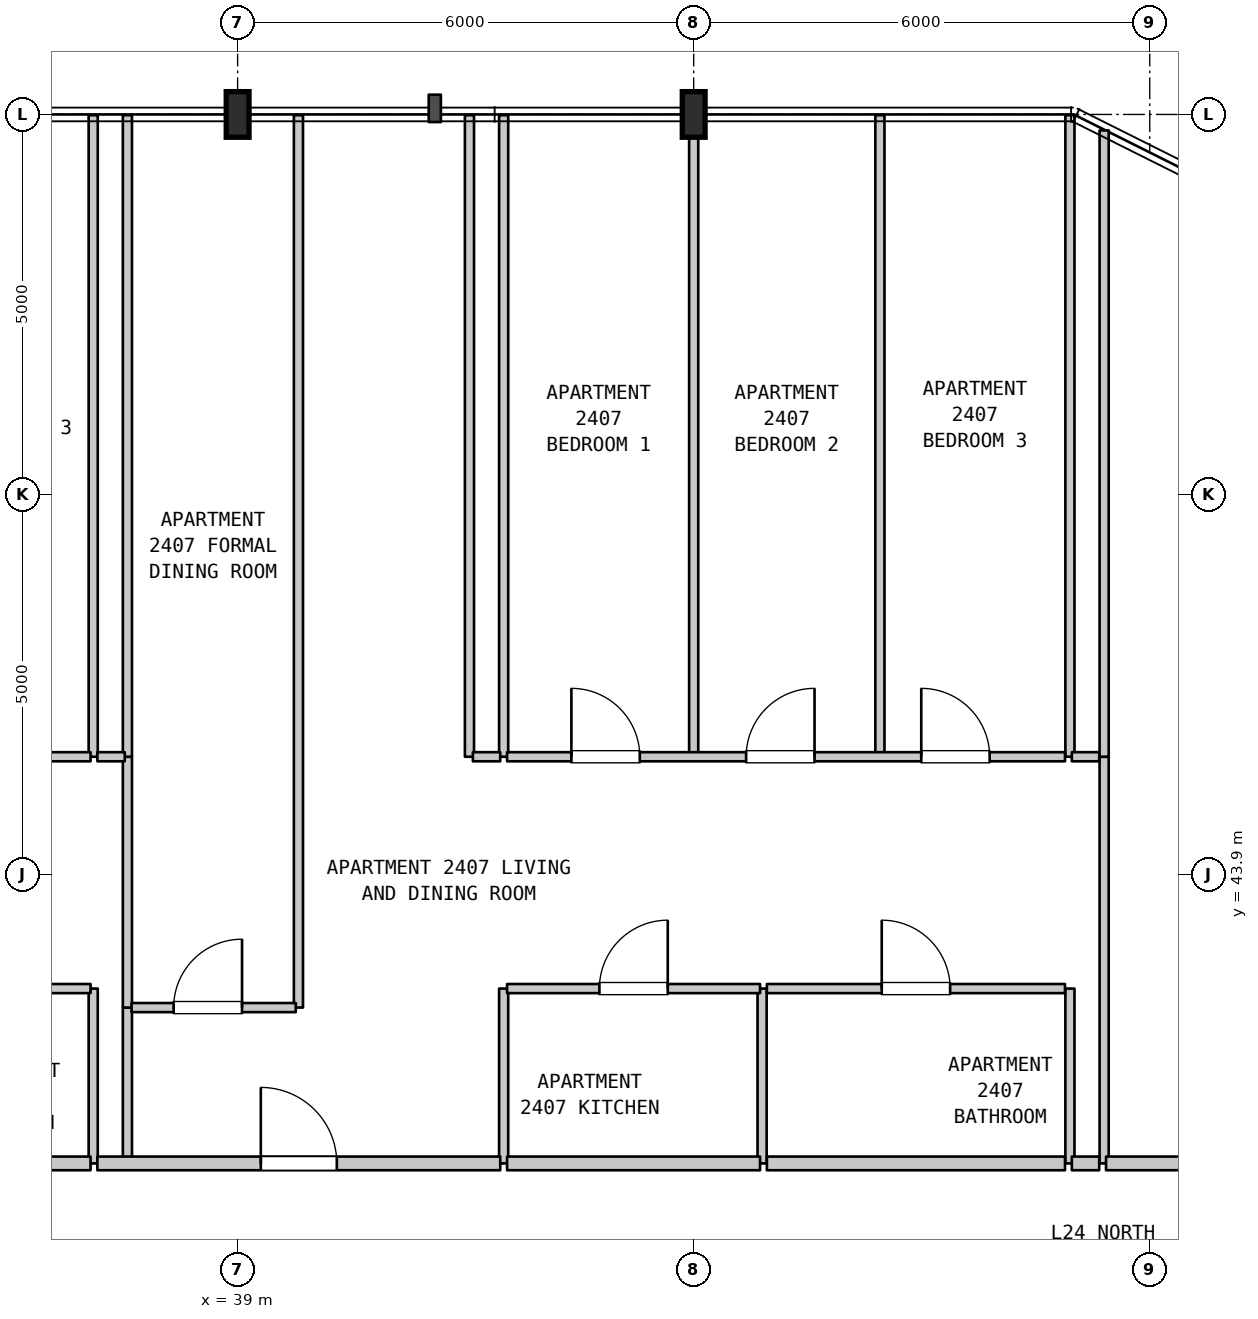
"""IFC4 building model, lengths in metres.
Left out: names, types, materials, properties, quantities, classifications, styles, units other than length and angle.
Written with IfcOpenShell. Run it as: python <this file> out.ifc"""

import sys

from ifc_helpers import new_model, si_unit, direction, frame, frame_2d, origin, origin_2d, place, context, subcontext, project, spatial, rectangle, i_section, extrude, element, fill, save


model = new_model("IFC4")
c1 = context("Model", 3, precision=1e-05, world=origin(), true_north=direction((0.0, 1.0)))
c2 = subcontext(c1, "Body", "Model", "MODEL_VIEW")
j1 = project(units=[si_unit("LENGTHUNIT", "METRE"), si_unit("PLANEANGLEUNIT", "RADIAN")], contexts=[c1])
p1 = place(None, origin())
s1 = spatial("IfcSite", under=j1, at=p1, CompositionType="ELEMENT")
p2 = place(p1, origin())
s2 = spatial("IfcBuilding", under=s1, at=p2, CompositionType="ELEMENT")
p3 = place(p2, frame((0.0, 0.0, 102.0)))
s3 = spatial("IfcBuildingStorey", under=s2, at=p3, CompositionType="ELEMENT", Elevation=102.0)
for number, where, z_axis, x_axis in (
    (1, (39.0, 53.9, 0.0), (0.0, 0.0, 1.0), (1.0, 0.0, 0.0)),
    (2, (45.0, 53.9, 0.0), (0.0, 0.0, 1.0), (1.0, 0.0, 0.0)),
):
    element("IfcColumn", number, at=place(p3, frame(where, z_axis=z_axis, x_axis=x_axis)), inside=s3, PredefinedType="COLUMN", context=c2, shape_type="SweptSolid", body=[
        extrude(i_section(OverallWidth=0.3, OverallDepth=0.6, WebThickness=0.015, FlangeThickness=0.03, FilletRadius=0.027, at=origin_2d()), origin(), (0.0, 0.0, 1.0), 3.7),
    ])
p4 = place(p3, frame((37.1, 40.1, 0.0), z_axis=(0.0, 0.0, 1.0), x_axis=(0.0, 1.0, 0.0)))
e3 = element("IfcWall", 3, at=p4, inside=s3, PredefinedType="PARTITIONING", context=c2, shape_type="SweptSolid", body=[
    extrude(rectangle(XDim=2.3, YDim=0.12, at=frame_2d((1.15, 0.0))), origin(), (0.0, 0.0, 1.0), 3.385),
])
p5 = place(p3, frame((37.1, 45.45, 0.0), z_axis=(0.0, 0.0, 1.0), x_axis=(0.0, 1.0, 0.0)))
e4 = element("IfcWall", 4, at=p5, inside=s3, PredefinedType="PARTITIONING", context=c2, shape_type="SweptSolid", body=[
    extrude(rectangle(XDim=8.44, YDim=0.12, at=frame_2d((4.22, 0.0))), origin(), (0.0, 0.0, 1.0), 3.385),
])
p6 = place(p3, frame((37.55, 40.1, 0.0), z_axis=(0.0, 0.0, 1.0), x_axis=(0.0, 1.0, 0.0)))
e5 = element("IfcWall", 5, at=p6, inside=s3, PredefinedType="PARTITIONING", context=c2, shape_type="SweptSolid", body=[
    extrude(rectangle(XDim=2.05, YDim=0.12, at=frame_2d((1.025, 0.0))), origin(), (0.0, 0.0, 1.0), 3.385),
])
p7 = place(p3, frame((37.55, 42.15, 0.0), z_axis=(0.0, 0.0, 1.0), x_axis=(0.0, 1.0, 0.0)))
e6 = element("IfcWall", 6, at=p7, inside=s3, PredefinedType="PARTITIONING", context=c2, shape_type="SweptSolid", body=[
    extrude(rectangle(XDim=3.3, YDim=0.12, at=frame_2d((1.65, 0.0))), origin(), (0.0, 0.0, 1.0), 3.385),
])
p8 = place(p3, frame((37.55, 45.45, 0.0), z_axis=(0.0, 0.0, 1.0), x_axis=(0.0, 1.0, 0.0)))
e7 = element("IfcWall", 7, at=p8, inside=s3, PredefinedType="PARTITIONING", context=c2, shape_type="SweptSolid", body=[
    extrude(rectangle(XDim=8.44, YDim=0.12, at=frame_2d((4.22, 0.0))), origin(), (0.0, 0.0, 1.0), 3.385),
])
p9 = place(p3, frame((39.8, 42.15, 0.0), z_axis=(0.0, 0.0, 1.0), x_axis=(0.0, 1.0, 0.0)))
e8 = element("IfcWall", 8, at=p9, inside=s3, PredefinedType="PARTITIONING", context=c2, shape_type="SweptSolid", body=[
    extrude(rectangle(XDim=11.74, YDim=0.12, at=frame_2d((5.87, 0.0))), origin(), (0.0, 0.0, 1.0), 3.385),
])
p10 = place(p3, frame((42.05, 45.45, 0.0), z_axis=(0.0, 0.0, 1.0), x_axis=(0.0, 1.0, 0.0)))
e9 = element("IfcWall", 9, at=p10, inside=s3, PredefinedType="PARTITIONING", context=c2, shape_type="SweptSolid", body=[
    extrude(rectangle(XDim=8.44, YDim=0.12, at=frame_2d((4.22, 0.0))), origin(), (0.0, 0.0, 1.0), 3.385),
])
p11 = place(p3, frame((42.5, 40.1, 0.0), z_axis=(0.0, 0.0, 1.0), x_axis=(0.0, 1.0, 0.0)))
e10 = element("IfcWall", 10, at=p11, inside=s3, PredefinedType="PARTITIONING", context=c2, shape_type="SweptSolid", body=[
    extrude(rectangle(XDim=2.3, YDim=0.12, at=frame_2d((1.15, 0.0))), origin(), (0.0, 0.0, 1.0), 3.385),
])
for number, where, z_axis, x_axis in (
    (11, (42.5, 45.45, 0.0), (0.0, 0.0, 1.0), (0.0, 1.0, 0.0)),
    (12, (45.0, 45.45, 0.0), (0.0, 0.0, 1.0), (0.0, 1.0, 0.0)),
):
    element("IfcWall", number, at=place(p3, frame(where, z_axis=z_axis, x_axis=x_axis)), inside=s3, PredefinedType="PARTITIONING", context=c2, shape_type="SweptSolid", body=[
        extrude(rectangle(XDim=8.44, YDim=0.12, at=frame_2d((4.22, 0.0))), origin(), (0.0, 0.0, 1.0), 3.385),
    ])
p12 = place(p3, frame((45.9, 40.1, 0.0), z_axis=(0.0, 0.0, 1.0), x_axis=(0.0, 1.0, 0.0)))
e13 = element("IfcWall", 13, at=p12, inside=s3, PredefinedType="PARTITIONING", context=c2, shape_type="SweptSolid", body=[
    extrude(rectangle(XDim=2.3, YDim=0.12, at=frame_2d((1.15, 0.0))), origin(), (0.0, 0.0, 1.0), 3.385),
])
p13 = place(p3, frame((47.45, 45.45, 0.0), z_axis=(0.0, 0.0, 1.0), x_axis=(0.0, 1.0, 0.0)))
e14 = element("IfcWall", 14, at=p13, inside=s3, PredefinedType="PARTITIONING", context=c2, shape_type="SweptSolid", body=[
    extrude(rectangle(XDim=8.44, YDim=0.12, at=frame_2d((4.22, 0.0))), origin(), (0.0, 0.0, 1.0), 3.385),
])
p14 = place(p3, frame((49.95, 40.1, 0.0), z_axis=(0.0, 0.0, 1.0), x_axis=(0.0, 1.0, 0.0)))
e15 = element("IfcWall", 15, at=p14, inside=s3, PredefinedType="PARTITIONING", context=c2, shape_type="SweptSolid", body=[
    extrude(rectangle(XDim=2.3, YDim=0.12, at=frame_2d((1.15, 0.0))), origin(), (0.0, 0.0, 1.0), 3.385),
])
p15 = place(p3, frame((49.95, 45.45, 0.0), z_axis=(0.0, 0.0, 1.0), x_axis=(0.0, 1.0, 0.0)))
e16 = element("IfcWall", 16, at=p15, inside=s3, PredefinedType="PARTITIONING", context=c2, shape_type="SweptSolid", body=[
    extrude(rectangle(XDim=8.44, YDim=0.12, at=frame_2d((4.22, 0.0))), origin(), (0.0, 0.0, 1.0), 3.385),
])
p16 = place(p3, frame((50.4, 40.1, 0.0), z_axis=(0.0, 0.0, 1.0), x_axis=(0.0, 1.0, 0.0)))
e17 = element("IfcWall", 17, at=p16, inside=s3, PredefinedType="PARTITIONING", context=c2, shape_type="SweptSolid", body=[
    extrude(rectangle(XDim=5.35, YDim=0.12, at=frame_2d((2.675, 0.0))), origin(), (0.0, 0.0, 1.0), 3.385),
])
p17 = place(p3, frame((50.4, 45.45, 0.0), z_axis=(0.0, 0.0, 1.0), x_axis=(0.0, 1.0, 0.0)))
e18 = element("IfcWall", 18, at=p17, inside=s3, PredefinedType="PARTITIONING", context=c2, shape_type="SweptSolid", body=[
    extrude(rectangle(XDim=8.24, YDim=0.12, at=frame_2d((4.12, 0.0))), origin(), (0.0, 0.0, 1.0), 3.385),
])
p18 = place(p3, frame((34.873, 40.1, 0.0), z_axis=(0.0, 0.0, 1.0), x_axis=(1.0, 0.0, 0.0)))
e19 = element("IfcWall", 19, at=p18, inside=s3, PredefinedType="STANDARD", context=c2, shape_type="SweptSolid", body=[
    extrude(rectangle(XDim=2.192, YDim=0.18, at=frame_2d((1.096, 0.0))), origin(), (0.0, 0.0, 1.0), 3.385),
])
p19 = place(p3, frame((37.155, 40.1, 0.0), z_axis=(0.0, 0.0, 1.0), x_axis=(1.0, 0.0, 0.0)))
e20 = element("IfcWall", 20, at=p19, inside=s3, PredefinedType="STANDARD", context=c2, shape_type="SweptSolid", body=[
    extrude(rectangle(XDim=5.3, YDim=0.18, at=frame_2d((2.65, 0.0))), origin(), (0.0, 0.0, 1.0), 3.385),
])
p20 = place(p19, frame((2.15, 0.0, 0.0)))
e21 = element("IfcOpeningElement", 21, at=p20, cuts=e20, PredefinedType="OPENING", context=c2, shape_type="SweptSolid", body=[
    extrude(rectangle(XDim=1.0, YDim=2.15, at=frame_2d((0.5, 1.075))), frame((0.0, 0.1, 0.0), z_axis=(0.0, -1.0, 0.0), x_axis=(1.0, 0.0, 0.0)), (0.0, 0.0, 1.0), 0.2),
])
p21 = place(p3, frame((42.545, 40.1, 0.0), z_axis=(0.0, 0.0, 1.0), x_axis=(1.0, 0.0, 0.0)))
e22 = element("IfcWall", 22, at=p21, inside=s3, PredefinedType="STANDARD", context=c2, shape_type="SweptSolid", body=[
    extrude(rectangle(XDim=3.328, YDim=0.18, at=frame_2d((1.664, 0.0))), origin(), (0.0, 0.0, 1.0), 3.385),
])
p22 = place(p3, frame((45.963, 40.1, 0.0), z_axis=(0.0, 0.0, 1.0), x_axis=(1.0, 0.0, 0.0)))
e23 = element("IfcWall", 23, at=p22, inside=s3, PredefinedType="STANDARD", context=c2, shape_type="SweptSolid", body=[
    extrude(rectangle(XDim=3.922, YDim=0.18, at=frame_2d((1.961, 0.0))), origin(), (0.0, 0.0, 1.0), 3.385),
])
p23 = place(p3, frame((49.975, 40.1, 0.0), z_axis=(0.0, 0.0, 1.0), x_axis=(1.0, 0.0, 0.0)))
e24 = element("IfcWall", 24, at=p23, inside=s3, PredefinedType="STANDARD", context=c2, shape_type="SweptSolid", body=[
    extrude(rectangle(XDim=0.36, YDim=0.18, at=frame_2d((0.18, 0.0))), origin(), (0.0, 0.0, 1.0), 3.385),
])
p24 = place(p3, frame((50.425, 40.1, 0.0), z_axis=(0.0, 0.0, 1.0), x_axis=(1.0, 0.0, 0.0)))
e25 = element("IfcWall", 25, at=p24, inside=s3, PredefinedType="STANDARD", context=c2, shape_type="SweptSolid", body=[
    extrude(rectangle(XDim=4.03, YDim=0.18, at=frame_2d((2.015, 0.0))), origin(), (0.0, 0.0, 1.0), 3.385),
])
p25 = place(p24, frame((1.515, 0.0, 0.0)))
e26 = element("IfcOpeningElement", 26, at=p25, cuts=e25, PredefinedType="OPENING", context=c2, shape_type="SweptSolid", body=[
    extrude(rectangle(XDim=1.0, YDim=2.15, at=frame_2d((0.5, 1.075))), frame((0.0, 0.1, 0.0), z_axis=(0.0, -1.0, 0.0), x_axis=(1.0, 0.0, 0.0)), (0.0, 0.0, 1.0), 0.2),
])
p26 = place(p3, frame((37.605, 42.15, 0.0), z_axis=(0.0, 0.0, 1.0), x_axis=(1.0, 0.0, 0.0)))
e27 = element("IfcWall", 27, at=p26, inside=s3, PredefinedType="PARTITIONING", context=c2, shape_type="SweptSolid", body=[
    extrude(rectangle(XDim=2.16, YDim=0.12, at=frame_2d((1.08, 0.0))), origin(), (0.0, 0.0, 1.0), 3.385),
])
p27 = place(p26, frame((0.553, 0.0, 0.0)))
e28 = element("IfcOpeningElement", 28, at=p27, cuts=e27, PredefinedType="OPENING", context=c2, shape_type="SweptSolid", body=[
    extrude(rectangle(XDim=0.9, YDim=2.15, at=frame_2d((0.45, 1.075))), frame((0.0, 0.07, 0.0), z_axis=(0.0, -1.0, 0.0), x_axis=(1.0, 0.0, 0.0)), (0.0, 0.0, 1.0), 0.14),
])
p28 = place(p3, frame((34.873, 42.4, 0.0), z_axis=(0.0, 0.0, 1.0), x_axis=(1.0, 0.0, 0.0)))
e29 = element("IfcWall", 29, at=p28, inside=s3, PredefinedType="PARTITIONING", context=c2, shape_type="SweptSolid", body=[
    extrude(rectangle(XDim=2.192, YDim=0.12, at=frame_2d((1.096, 0.0))), origin(), (0.0, 0.0, 1.0), 3.385),
])
p29 = place(p28, frame((0.646, 0.0, 0.0)))
e30 = element("IfcOpeningElement", 30, at=p29, cuts=e29, PredefinedType="OPENING", context=c2, shape_type="SweptSolid", body=[
    extrude(rectangle(XDim=0.9, YDim=2.1, at=frame_2d((0.45, 1.05))), frame((0.0, 0.07, 0.0), z_axis=(0.0, -1.0, 0.0), x_axis=(1.0, 0.0, 0.0)), (0.0, 0.0, 1.0), 0.14),
])
p30 = place(p3, frame((42.545, 42.4, 0.0), z_axis=(0.0, 0.0, 1.0), x_axis=(1.0, 0.0, 0.0)))
e31 = element("IfcWall", 31, at=p30, inside=s3, PredefinedType="PARTITIONING", context=c2, shape_type="SweptSolid", body=[
    extrude(rectangle(XDim=3.328, YDim=0.12, at=frame_2d((1.664, 0.0))), origin(), (0.0, 0.0, 1.0), 3.385),
])
p31 = place(p30, frame((1.214, 0.0, 0.0)))
e32 = element("IfcOpeningElement", 32, at=p31, cuts=e31, PredefinedType="OPENING", context=c2, shape_type="SweptSolid", body=[
    extrude(rectangle(XDim=0.9, YDim=2.15, at=frame_2d((0.45, 1.075))), frame((0.0, 0.07, 0.0), z_axis=(0.0, -1.0, 0.0), x_axis=(1.0, 0.0, 0.0)), (0.0, 0.0, 1.0), 0.14),
])
p32 = place(p3, frame((45.963, 42.4, 0.0), z_axis=(0.0, 0.0, 1.0), x_axis=(1.0, 0.0, 0.0)))
e33 = element("IfcWall", 33, at=p32, inside=s3, PredefinedType="PARTITIONING", context=c2, shape_type="SweptSolid", body=[
    extrude(rectangle(XDim=3.922, YDim=0.12, at=frame_2d((1.961, 0.0))), origin(), (0.0, 0.0, 1.0), 3.385),
])
p33 = place(p32, frame((1.511, 0.0, 0.0)))
e34 = element("IfcOpeningElement", 34, at=p33, cuts=e33, PredefinedType="OPENING", context=c2, shape_type="SweptSolid", body=[
    extrude(rectangle(XDim=0.9, YDim=2.1, at=frame_2d((0.45, 1.05))), frame((0.0, 0.07, 0.0), z_axis=(0.0, -1.0, 0.0), x_axis=(1.0, 0.0, 0.0)), (0.0, 0.0, 1.0), 0.14),
])
p34 = place(p3, frame((29.005, 45.45, 0.0), z_axis=(0.0, 0.0, 1.0), x_axis=(1.0, 0.0, 0.0)))
e35 = element("IfcWall", 35, at=p34, inside=s3, PredefinedType="PARTITIONING", context=c2, shape_type="SweptSolid", body=[
    extrude(rectangle(XDim=8.06, YDim=0.12, at=frame_2d((4.03, 0.0))), origin(), (0.0, 0.0, 1.0), 3.385),
])
p35 = place(p34, frame((0.968, 0.0, 0.0)))
e36 = element("IfcOpeningElement", 36, at=p35, cuts=e35, PredefinedType="OPENING", context=c2, shape_type="SweptSolid", body=[
    extrude(rectangle(XDim=0.9, YDim=2.15, at=frame_2d((0.45, 1.075))), frame((0.0, 0.07, 0.0), z_axis=(0.0, -1.0, 0.0), x_axis=(1.0, 0.0, 0.0)), (0.0, 0.0, 1.0), 0.14),
])
p36 = place(p34, frame((3.507, 0.0, 0.0)))
e37 = element("IfcOpeningElement", 37, at=p36, cuts=e35, PredefinedType="OPENING", context=c2, shape_type="SweptSolid", body=[
    extrude(rectangle(XDim=0.9, YDim=2.15, at=frame_2d((0.45, 1.075))), frame((0.0, 0.07, 0.0), z_axis=(0.0, -1.0, 0.0), x_axis=(1.0, 0.0, 0.0)), (0.0, 0.0, 1.0), 0.14),
])
p37 = place(p34, frame((6.051, 0.0, 0.0)))
e38 = element("IfcOpeningElement", 38, at=p37, cuts=e35, PredefinedType="OPENING", context=c2, shape_type="SweptSolid", body=[
    extrude(rectangle(XDim=0.9, YDim=2.15, at=frame_2d((0.45, 1.075))), frame((0.0, 0.07, 0.0), z_axis=(0.0, -1.0, 0.0), x_axis=(1.0, 0.0, 0.0)), (0.0, 0.0, 1.0), 0.14),
])
p38 = place(p3, frame((37.155, 45.45, 0.0), z_axis=(0.0, 0.0, 1.0), x_axis=(1.0, 0.0, 0.0)))
e39 = element("IfcWall", 39, at=p38, inside=s3, PredefinedType="PARTITIONING", context=c2, shape_type="SweptSolid", body=[
    extrude(rectangle(XDim=0.36, YDim=0.12, at=frame_2d((0.18, 0.0))), origin(), (0.0, 0.0, 1.0), 3.385),
])
p39 = place(p3, frame((42.095, 45.45, 0.0), z_axis=(0.0, 0.0, 1.0), x_axis=(1.0, 0.0, 0.0)))
e40 = element("IfcWall", 40, at=p39, inside=s3, PredefinedType="PARTITIONING", context=c2, shape_type="SweptSolid", body=[
    extrude(rectangle(XDim=0.36, YDim=0.12, at=frame_2d((0.18, 0.0))), origin(), (0.0, 0.0, 1.0), 3.385),
])
p40 = place(p3, frame((42.545, 45.45, 0.0), z_axis=(0.0, 0.0, 1.0), x_axis=(1.0, 0.0, 0.0)))
e41 = element("IfcWall", 41, at=p40, inside=s3, PredefinedType="PARTITIONING", context=c2, shape_type="SweptSolid", body=[
    extrude(rectangle(XDim=7.34, YDim=0.12, at=frame_2d((3.67, 0.0))), origin(), (0.0, 0.0, 1.0), 3.385),
])
p41 = place(p40, frame((0.846, 0.0, 0.0)))
e42 = element("IfcOpeningElement", 42, at=p41, cuts=e41, PredefinedType="OPENING", context=c2, shape_type="SweptSolid", body=[
    extrude(rectangle(XDim=0.9, YDim=2.15, at=frame_2d((0.45, 1.075))), frame((0.0, 0.07, 0.0), z_axis=(0.0, -1.0, 0.0), x_axis=(1.0, 0.0, 0.0)), (0.0, 0.0, 1.0), 0.14),
])
p42 = place(p40, frame((3.145, 0.0, 0.0)))
e43 = element("IfcOpeningElement", 43, at=p42, cuts=e41, PredefinedType="OPENING", context=c2, shape_type="SweptSolid", body=[
    extrude(rectangle(XDim=0.9, YDim=2.15, at=frame_2d((0.45, 1.075))), frame((0.0, 0.07, 0.0), z_axis=(0.0, -1.0, 0.0), x_axis=(1.0, 0.0, 0.0)), (0.0, 0.0, 1.0), 0.14),
])
p43 = place(p40, frame((5.449, 0.0, 0.0)))
e44 = element("IfcOpeningElement", 44, at=p43, cuts=e41, PredefinedType="OPENING", context=c2, shape_type="SweptSolid", body=[
    extrude(rectangle(XDim=0.9, YDim=2.15, at=frame_2d((0.45, 1.075))), frame((0.0, 0.07, 0.0), z_axis=(0.0, -1.0, 0.0), x_axis=(1.0, 0.0, 0.0)), (0.0, 0.0, 1.0), 0.14),
])
p44 = place(p3, frame((49.975, 45.45, 0.0), z_axis=(0.0, 0.0, 1.0), x_axis=(1.0, 0.0, 0.0)))
e45 = element("IfcWall", 45, at=p44, inside=s3, PredefinedType="PARTITIONING", context=c2, shape_type="SweptSolid", body=[
    extrude(rectangle(XDim=0.36, YDim=0.12, at=frame_2d((0.18, 0.0))), origin(), (0.0, 0.0, 1.0), 3.385),
])
p45 = place(p20, origin())
e46 = element("IfcDoor", 46, at=p45, inside=s3, OperationType="SINGLE_SWING_LEFT", PredefinedType="DOOR", context=c2, shape_type="SweptSolid", body=[
    extrude(rectangle(XDim=1.0, YDim=2.15, at=frame_2d((0.5, 1.075))), frame((0.0, 0.025, 0.0), z_axis=(0.0, -1.0, 0.0), x_axis=(1.0, 0.0, 0.0)), (0.0, 0.0, 1.0), 0.05),
])
fill(e21, e46)
p46 = place(p27, origin())
e47 = element("IfcDoor", 47, at=p46, inside=s3, OperationType="SINGLE_SWING_RIGHT", PredefinedType="DOOR", context=c2, shape_type="SweptSolid", body=[
    extrude(rectangle(XDim=0.9, YDim=2.15, at=frame_2d((0.45, 1.075))), frame((0.0, 0.025, 0.0), z_axis=(0.0, -1.0, 0.0), x_axis=(1.0, 0.0, 0.0)), (0.0, 0.0, 1.0), 0.05),
])
fill(e28, e47)
p47 = place(p31, origin())
e48 = element("IfcDoor", 48, at=p47, inside=s3, OperationType="SINGLE_SWING_RIGHT", PredefinedType="DOOR", context=c2, shape_type="SweptSolid", body=[
    extrude(rectangle(XDim=0.9, YDim=2.15, at=frame_2d((0.45, 1.075))), frame((0.0, 0.025, 0.0), z_axis=(0.0, -1.0, 0.0), x_axis=(1.0, 0.0, 0.0)), (0.0, 0.0, 1.0), 0.05),
])
fill(e32, e48)
p48 = place(p33, origin())
e49 = element("IfcDoor", 49, at=p48, inside=s3, OperationType="SINGLE_SWING_LEFT", PredefinedType="DOOR", context=c2, shape_type="SweptSolid", body=[
    extrude(rectangle(XDim=0.9, YDim=2.1, at=frame_2d((0.45, 1.05))), frame((0.0, 0.025, 0.0), z_axis=(0.0, -1.0, 0.0), x_axis=(1.0, 0.0, 0.0)), (0.0, 0.0, 1.0), 0.05),
])
fill(e34, e49)
p49 = place(p41, origin())
e50 = element("IfcDoor", 50, at=p49, inside=s3, OperationType="SINGLE_SWING_LEFT", PredefinedType="DOOR", context=c2, shape_type="SweptSolid", body=[
    extrude(rectangle(XDim=0.9, YDim=2.15, at=frame_2d((0.45, 1.075))), frame((0.0, 0.025, 0.0), z_axis=(0.0, -1.0, 0.0), x_axis=(1.0, 0.0, 0.0)), (0.0, 0.0, 1.0), 0.05),
])
fill(e42, e50)
p50 = place(p42, origin())
e51 = element("IfcDoor", 51, at=p50, inside=s3, OperationType="SINGLE_SWING_RIGHT", PredefinedType="DOOR", context=c2, shape_type="SweptSolid", body=[
    extrude(rectangle(XDim=0.9, YDim=2.15, at=frame_2d((0.45, 1.075))), frame((0.0, 0.025, 0.0), z_axis=(0.0, -1.0, 0.0), x_axis=(1.0, 0.0, 0.0)), (0.0, 0.0, 1.0), 0.05),
])
fill(e43, e51)
p51 = place(p43, origin())
e52 = element("IfcDoor", 52, at=p51, inside=s3, OperationType="SINGLE_SWING_LEFT", PredefinedType="DOOR", context=c2, shape_type="SweptSolid", body=[
    extrude(rectangle(XDim=0.9, YDim=2.15, at=frame_2d((0.45, 1.075))), frame((0.0, 0.025, 0.0), z_axis=(0.0, -1.0, 0.0), x_axis=(1.0, 0.0, 0.0)), (0.0, 0.0, 1.0), 0.05),
])
fill(e44, e52)
save(model, sys.argv[1])
